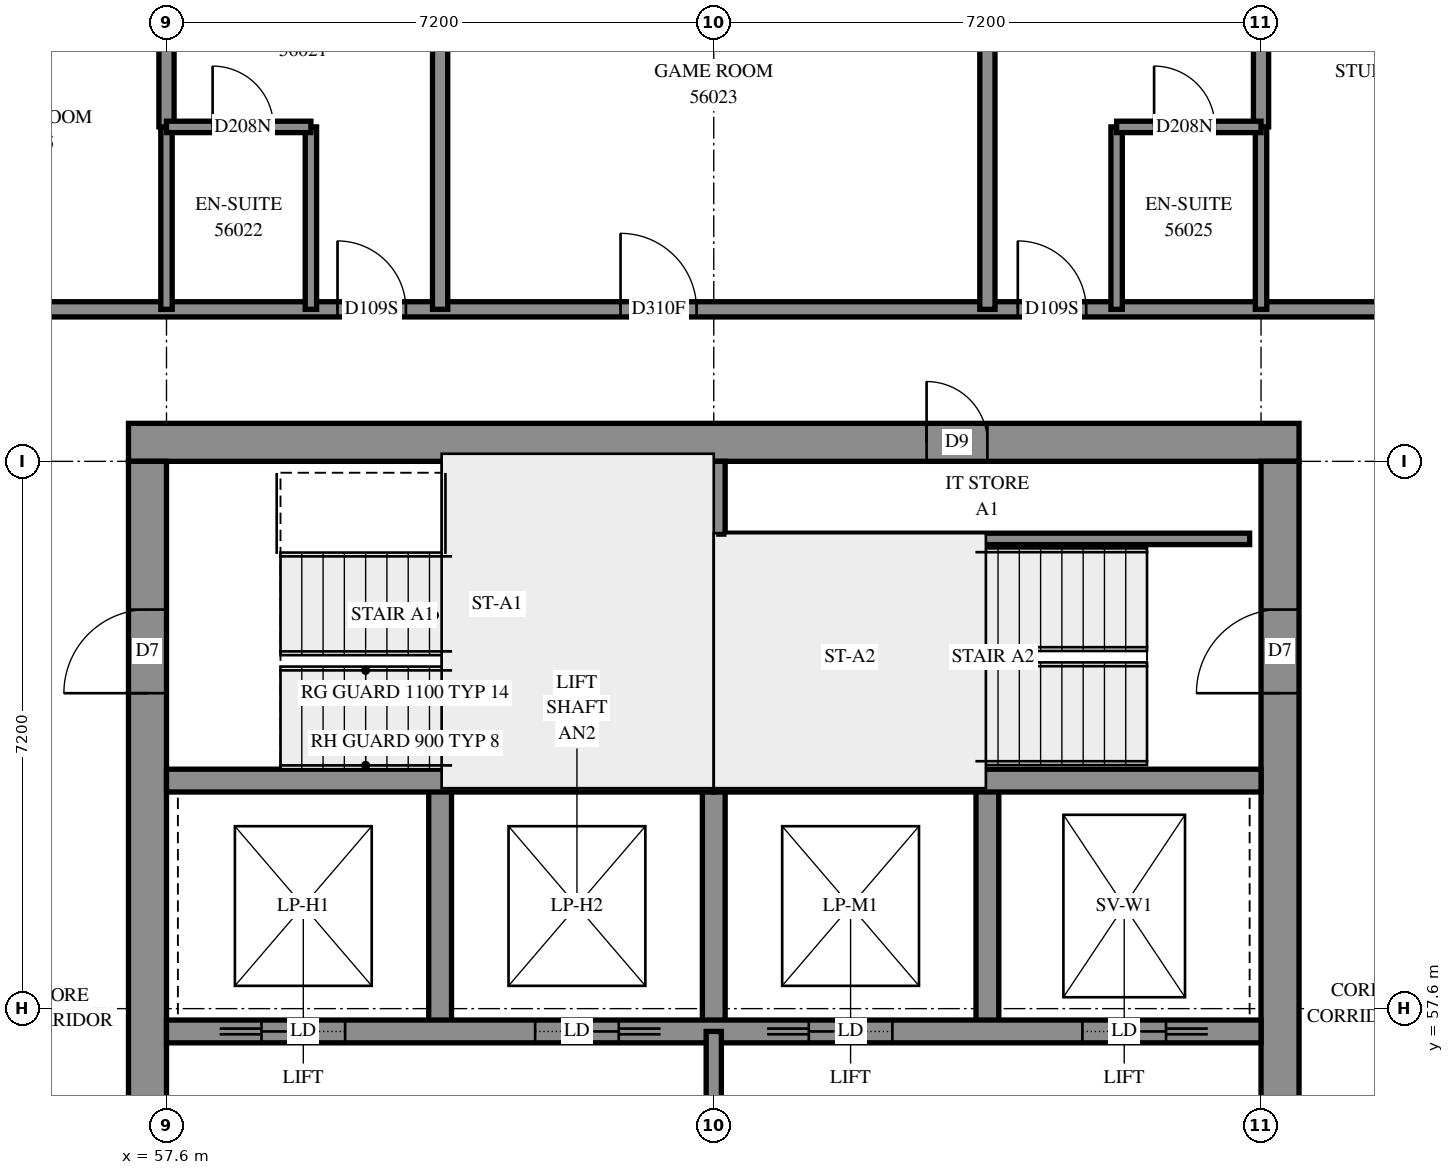
"""IFC4 building model, lengths in metres.
Left out: names, types, materials, properties, quantities, classifications, styles, units other than length and angle.
Written with IfcOpenShell. Run it as: python <this file> out.ifc"""

import sys

from ifc_helpers import new_model, si_unit, direction, frame, frame_2d, origin, place, context, subcontext, project, spatial, rectangle, extrude, element, fill, save


model = new_model("IFC4")
c1 = context("Model", 3, precision=1e-05, world=origin(), true_north=direction((0.0, 1.0)))
c2 = subcontext(c1, "Body", "Model", "MODEL_VIEW")
j1 = project(units=[si_unit("LENGTHUNIT", "METRE"), si_unit("PLANEANGLEUNIT", "RADIAN")], contexts=[c1])
p1 = place(None, origin())
s1 = spatial("IfcSite", under=j1, at=p1, CompositionType="ELEMENT")
p2 = place(p1, origin())
s2 = spatial("IfcBuilding", under=s1, at=p2, CompositionType="ELEMENT")
p3 = place(p2, frame((0.0, 0.0, 206.6)))
s3 = spatial("IfcBuildingStorey", under=s2, at=p3, CompositionType="ELEMENT", Elevation=206.6)
p4 = place(p3, frame((57.1, 65.05, -0.3), z_axis=(0.0, 0.0, 1.0), x_axis=(1.0, 0.0, 0.0)))
e1 = element("IfcWall", 1, at=p4, inside=s3, PredefinedType="SHEAR", context=c2, shape_type="SweptSolid", body=[
    extrude(rectangle(XDim=15.4, YDim=0.5, at=frame_2d((7.7, 0.0))), origin(), (0.0, 0.0, 1.0), 2.7),
])
p5 = place(p4, frame((10.5, 0.0, 0.3)))
e2 = element("IfcOpeningElement", 2, at=p5, cuts=e1, PredefinedType="OPENING", context=c2, shape_type="SweptSolid", body=[
    extrude(rectangle(XDim=0.8, YDim=2.1, at=frame_2d((0.4, 1.05))), frame((0.0, 0.26, 0.0), z_axis=(0.0, -1.0, 0.0), x_axis=(1.0, 0.0, 0.0)), (0.0, 0.0, 1.0), 0.52),
])
p6 = place(p3, frame((57.35, 50.4, -0.3), z_axis=(0.0, 0.0, 1.0), x_axis=(0.0, 1.0, 0.0)))
e3 = element("IfcWall", 3, at=p6, inside=s3, PredefinedType="SHEAR", context=c2, shape_type="SweptSolid", body=[
    extrude(rectangle(XDim=14.4, YDim=0.5, at=frame_2d((7.2, 0.0))), origin(), (0.0, 0.0, 1.0), 2.7),
])
p7 = place(p6, frame((4.55, 0.0, 0.3)))
e4 = element("IfcOpeningElement", 4, at=p7, cuts=e3, PredefinedType="OPENING", context=c2, shape_type="SweptSolid", body=[
    extrude(rectangle(XDim=1.1, YDim=2.1, at=frame_2d((0.55, 1.05))), frame((0.0, 0.26, 0.0), z_axis=(0.0, -1.0, 0.0), x_axis=(1.0, 0.0, 0.0)), (0.0, 0.0, 1.0), 0.52),
])
p8 = place(p6, frame((11.35, 0.0, 0.3)))
e5 = element("IfcOpeningElement", 5, at=p8, cuts=e3, PredefinedType="OPENING", context=c2, shape_type="SweptSolid", body=[
    extrude(rectangle(XDim=1.1, YDim=2.1, at=frame_2d((0.55, 1.05))), frame((0.0, 0.26, 0.0), z_axis=(0.0, -1.0, 0.0), x_axis=(1.0, 0.0, 0.0)), (0.0, 0.0, 1.0), 0.52),
])
p9 = place(p3, frame((72.25, 50.4, -0.3), z_axis=(0.0, 0.0, 1.0), x_axis=(0.0, 1.0, 0.0)))
e6 = element("IfcWall", 6, at=p9, inside=s3, PredefinedType="SHEAR", context=c2, shape_type="SweptSolid", body=[
    extrude(rectangle(XDim=14.4, YDim=0.5, at=frame_2d((7.2, 0.0))), origin(), (0.0, 0.0, 1.0), 2.7),
])
p10 = place(p9, frame((4.55, 0.0, 0.3)))
e7 = element("IfcOpeningElement", 7, at=p10, cuts=e6, PredefinedType="OPENING", context=c2, shape_type="SweptSolid", body=[
    extrude(rectangle(XDim=1.1, YDim=2.1, at=frame_2d((0.55, 1.05))), frame((0.0, 0.26, 0.0), z_axis=(0.0, -1.0, 0.0), x_axis=(1.0, 0.0, 0.0)), (0.0, 0.0, 1.0), 0.52),
])
p11 = place(p9, frame((11.35, 0.0, 0.3)))
e8 = element("IfcOpeningElement", 8, at=p11, cuts=e6, PredefinedType="OPENING", context=c2, shape_type="SweptSolid", body=[
    extrude(rectangle(XDim=1.1, YDim=2.1, at=frame_2d((0.55, 1.05))), frame((0.0, 0.26, 0.0), z_axis=(0.0, -1.0, 0.0), x_axis=(1.0, 0.0, 0.0)), (0.0, 0.0, 1.0), 0.52),
])
for number, where, z_axis, x_axis in (
    (9, (61.2, 57.3, 0.0), (0.0, 0.0, 1.0), (0.0, 1.0, 0.0)),
    (10, (64.8, 57.3, 0.0), (0.0, 0.0, 1.0), (0.0, 1.0, 0.0)),
    (11, (68.4, 57.3, 0.0), (0.0, 0.0, 1.0), (0.0, 1.0, 0.0)),
):
    element("IfcWall", number, at=place(p3, frame(where, z_axis=z_axis, x_axis=x_axis)), inside=s3, PredefinedType="SOLIDWALL", context=c2, shape_type="SweptSolid", body=[
        extrude(rectangle(XDim=3.3, YDim=0.3, at=frame_2d((1.65, 0.0))), origin(), (0.0, 0.0, 1.0), 3.1),
    ])
p12 = place(p3, frame((57.6, 57.3, 0.0), z_axis=(0.0, 0.0, 1.0), x_axis=(1.0, 0.0, 0.0)))
e12 = element("IfcWall", 12, at=p12, inside=s3, PredefinedType="SOLIDWALL", context=c2, shape_type="SweptSolid", body=[
    extrude(rectangle(XDim=14.4, YDim=0.3, at=frame_2d((7.2, 0.0))), origin(), (0.0, 0.0, 1.0), 3.1),
])
p13 = place(p12, frame((1.25, 0.0, 0.0)))
e13 = element("IfcOpeningElement", 13, at=p13, cuts=e12, PredefinedType="OPENING", context=c2, shape_type="SweptSolid", body=[
    extrude(rectangle(XDim=1.1, YDim=2.1, at=frame_2d((0.55, 1.05))), frame((0.0, 0.16, 0.0), z_axis=(0.0, -1.0, 0.0), x_axis=(1.0, 0.0, 0.0)), (0.0, 0.0, 1.0), 0.32),
])
p14 = place(p12, frame((4.85, 0.0, 0.0)))
e14 = element("IfcOpeningElement", 14, at=p14, cuts=e12, PredefinedType="OPENING", context=c2, shape_type="SweptSolid", body=[
    extrude(rectangle(XDim=1.1, YDim=2.1, at=frame_2d((0.55, 1.05))), frame((0.0, 0.16, 0.0), z_axis=(0.0, -1.0, 0.0), x_axis=(1.0, 0.0, 0.0)), (0.0, 0.0, 1.0), 0.32),
])
p15 = place(p12, frame((8.45, 0.0, 0.0)))
e15 = element("IfcOpeningElement", 15, at=p15, cuts=e12, PredefinedType="OPENING", context=c2, shape_type="SweptSolid", body=[
    extrude(rectangle(XDim=1.1, YDim=2.1, at=frame_2d((0.55, 1.05))), frame((0.0, 0.16, 0.0), z_axis=(0.0, -1.0, 0.0), x_axis=(1.0, 0.0, 0.0)), (0.0, 0.0, 1.0), 0.32),
])
p16 = place(p12, frame((12.05, 0.0, 0.0)))
e16 = element("IfcOpeningElement", 16, at=p16, cuts=e12, PredefinedType="OPENING", context=c2, shape_type="SweptSolid", body=[
    extrude(rectangle(XDim=1.1, YDim=2.1, at=frame_2d((0.55, 1.05))), frame((0.0, 0.16, 0.0), z_axis=(0.0, -1.0, 0.0), x_axis=(1.0, 0.0, 0.0)), (0.0, 0.0, 1.0), 0.32),
])
for number, where, z_axis, x_axis in (
    (17, (57.6, 60.6, 0.0), (0.0, 0.0, 1.0), (1.0, 0.0, 0.0)),
    (18, (64.8, 60.6, 0.0), (0.0, 0.0, 1.0), (1.0, 0.0, 0.0)),
):
    element("IfcWall", number, at=place(p3, frame(where, z_axis=z_axis, x_axis=x_axis)), inside=s3, PredefinedType="SOLIDWALL", context=c2, shape_type="SweptSolid", body=[
        extrude(rectangle(XDim=7.2, YDim=0.3, at=frame_2d((3.6, 0.0))), origin(), (0.0, 0.0, 1.0), 3.1),
    ])
p17 = place(p3, frame((64.8, 60.6, 0.0), z_axis=(0.0, 0.0, 1.0), x_axis=(0.0, 1.0, 0.0)))
e19 = element("IfcWall", 19, at=p17, inside=s3, PredefinedType="SOLIDWALL", context=c2, shape_type="SweptSolid", body=[
    extrude(rectangle(XDim=4.2, YDim=0.3, at=frame_2d((2.1, 0.0))), origin(), (0.0, 0.0, 1.0), 3.1),
])
p18 = place(p3, frame((64.95, 63.78, 0.0), z_axis=(0.0, 0.0, 1.0), x_axis=(1.0, 0.0, 0.0)))
e20 = element("IfcWall", 20, at=p18, inside=s3, PredefinedType="PARTITIONING", context=c2, shape_type="SweptSolid", body=[
    extrude(rectangle(XDim=6.9, YDim=0.15, at=frame_2d((3.45, 0.0))), origin(), (0.0, 0.0, 1.0), 3.1),
])
p19 = place(p3, frame((64.8, 53.7, 0.0), z_axis=(0.0, 0.0, 1.0), x_axis=(0.0, 1.0, 0.0)))
e21 = element("IfcWall", 21, at=p19, inside=s3, PredefinedType="PARTITIONING", context=c2, shape_type="SweptSolid", body=[
    extrude(rectangle(XDim=3.6, YDim=0.2, at=frame_2d((1.8, 0.0))), origin(), (0.0, 0.0, 1.0), 3.1),
])
p20 = place(p3, frame((55.6, 66.8, 0.0), z_axis=(0.0, 0.0, 1.0), x_axis=(1.0, 0.0, 0.0)))
e22 = element("IfcWall", 22, at=p20, inside=s3, PredefinedType="PARTITIONING", context=c2, shape_type="SweptSolid", body=[
    extrude(rectangle(XDim=18.4, YDim=0.2, at=frame_2d((9.2, 0.0))), origin(), (0.0, 0.0, 1.0), 3.1),
])
p21 = place(p20, frame((4.25, 0.0, 0.0)))
e23 = element("IfcOpeningElement", 23, at=p21, cuts=e22, PredefinedType="OPENING", context=c2, shape_type="SweptSolid", body=[
    extrude(rectangle(XDim=0.9, YDim=2.1, at=frame_2d((0.45, 1.05))), frame((0.0, 0.11, 0.0), z_axis=(0.0, -1.0, 0.0), x_axis=(1.0, 0.0, 0.0)), (0.0, 0.0, 1.0), 0.22),
])
p22 = place(p20, frame((7.974, 0.0, 0.0)))
e24 = element("IfcOpeningElement", 24, at=p22, cuts=e22, PredefinedType="OPENING", context=c2, shape_type="SweptSolid", body=[
    extrude(rectangle(XDim=1.0, YDim=2.1, at=frame_2d((0.5, 1.05))), frame((0.0, 0.11, 0.0), z_axis=(0.0, -1.0, 0.0), x_axis=(1.0, 0.0, 0.0)), (0.0, 0.0, 1.0), 0.22),
])
p23 = place(p20, frame((13.2, 0.0, 0.0)))
e25 = element("IfcOpeningElement", 25, at=p23, cuts=e22, PredefinedType="OPENING", context=c2, shape_type="SweptSolid", body=[
    extrude(rectangle(XDim=0.9, YDim=2.1, at=frame_2d((0.45, 1.05))), frame((0.0, 0.11, 0.0), z_axis=(0.0, -1.0, 0.0), x_axis=(1.0, 0.0, 0.0)), (0.0, 0.0, 1.0), 0.22),
])
p24 = place(p3, frame((68.4, 66.8, 0.0), z_axis=(0.0, 0.0, 1.0), x_axis=(0.0, 1.0, 0.0)))
e26 = element("IfcWall", 26, at=p24, inside=s3, PredefinedType="PARTITIONING", context=c2, shape_type="SweptSolid", body=[
    extrude(rectangle(XDim=5.926, YDim=0.2, at=frame_2d((2.963, 0.0))), origin(), (0.0, 0.0, 1.0), 3.1),
])
p25 = place(p3, frame((61.2, 66.8, 0.0), z_axis=(0.0, 0.0, 1.0), x_axis=(0.0, 1.0, 0.0)))
e27 = element("IfcWall", 27, at=p25, inside=s3, PredefinedType="PARTITIONING", context=c2, shape_type="SweptSolid", body=[
    extrude(rectangle(XDim=5.921, YDim=0.2, at=frame_2d((2.96, 0.0))), origin(), (0.0, 0.0, 1.0), 3.1),
])
for number, where, z_axis, x_axis in (
    (28, (57.6, 66.8, 0.0), (0.0, 0.0, 1.0), (0.0, 1.0, 0.0)),
    (29, (59.5, 66.8, 0.0), (0.0, 0.0, 1.0), (0.0, 1.0, 0.0)),
    (30, (70.1, 66.8, 0.0), (0.0, 0.0, 1.0), (0.0, 1.0, 0.0)),
    (31, (72.0, 66.8, 0.0), (0.0, 0.0, 1.0), (0.0, 1.0, 0.0)),
):
    element("IfcWall", number, at=place(p3, frame(where, z_axis=z_axis, x_axis=x_axis)), inside=s3, PredefinedType="PARTITIONING", context=c2, shape_type="SweptSolid", body=[
        extrude(rectangle(XDim=2.4, YDim=0.15, at=frame_2d((1.2, 0.0))), origin(), (0.0, 0.0, 1.0), 3.1),
    ])
p26 = place(p3, frame((72.0, 69.2, 0.0), z_axis=(0.0, 0.0, 1.0), x_axis=(0.0, 1.0, 0.0)))
e32 = element("IfcWall", 32, at=p26, inside=s3, PredefinedType="PARTITIONING", context=c2, shape_type="SweptSolid", body=[
    extrude(rectangle(XDim=2.4, YDim=0.2, at=frame_2d((1.2, 0.0))), origin(), (0.0, 0.0, 1.0), 3.1),
])
p27 = place(p3, frame((57.6, 69.2, 0.0), z_axis=(0.0, 0.0, 1.0), x_axis=(0.0, 1.0, 0.0)))
e33 = element("IfcWall", 33, at=p27, inside=s3, PredefinedType="PARTITIONING", context=c2, shape_type="SweptSolid", body=[
    extrude(rectangle(XDim=2.296, YDim=0.2, at=frame_2d((1.148, 0.0))), origin(), (0.0, 0.0, 1.0), 3.1),
])
p28 = place(p3, frame((70.1, 69.2, 0.0), z_axis=(0.0, 0.0, 1.0), x_axis=(1.0, 0.0, 0.0)))
e34 = element("IfcWall", 34, at=p28, inside=s3, PredefinedType="PARTITIONING", context=c2, shape_type="SweptSolid", body=[
    extrude(rectangle(XDim=1.9, YDim=0.15, at=frame_2d((0.95, 0.0))), origin(), (0.0, 0.0, 1.0), 3.1),
])
p29 = place(p28, frame((0.493, 0.0, 0.0)))
e35 = element("IfcOpeningElement", 35, at=p29, cuts=e34, PredefinedType="OPENING", context=c2, shape_type="SweptSolid", body=[
    extrude(rectangle(XDim=0.8, YDim=2.1, at=frame_2d((0.4, 1.05))), frame((0.0, 0.085, 0.0), z_axis=(0.0, -1.0, 0.0), x_axis=(1.0, 0.0, 0.0)), (0.0, 0.0, 1.0), 0.17),
])
p30 = place(p3, frame((57.6, 69.2, 0.0), z_axis=(0.0, 0.0, 1.0), x_axis=(1.0, 0.0, 0.0)))
e36 = element("IfcWall", 36, at=p30, inside=s3, PredefinedType="PARTITIONING", context=c2, shape_type="SweptSolid", body=[
    extrude(rectangle(XDim=1.9, YDim=0.15, at=frame_2d((0.95, 0.0))), origin(), (0.0, 0.0, 1.0), 3.1),
])
p31 = place(p30, frame((0.607, 0.0, 0.0)))
e37 = element("IfcOpeningElement", 37, at=p31, cuts=e36, PredefinedType="OPENING", context=c2, shape_type="SweptSolid", body=[
    extrude(rectangle(XDim=0.8, YDim=2.1, at=frame_2d((0.4, 1.05))), frame((0.0, 0.085, 0.0), z_axis=(0.0, -1.0, 0.0), x_axis=(1.0, 0.0, 0.0)), (0.0, 0.0, 1.0), 0.17),
])
p32 = place(p5, origin())
e38 = element("IfcDoor", 38, at=p32, inside=s3, OperationType="SINGLE_SWING_RIGHT", PredefinedType="DOOR", context=c2, shape_type="SweptSolid", body=[
    extrude(rectangle(XDim=0.8, YDim=2.1, at=frame_2d((0.4, 1.05))), frame((0.0, 0.025, 0.0), z_axis=(0.0, -1.0, 0.0), x_axis=(1.0, 0.0, 0.0)), (0.0, 0.0, 1.0), 0.05),
])
fill(e2, e38)
p33 = place(p8, origin())
e39 = element("IfcDoor", 39, at=p33, inside=s3, OperationType="SINGLE_SWING_LEFT", PredefinedType="DOOR", context=c2, shape_type="SweptSolid", body=[
    extrude(rectangle(XDim=1.1, YDim=2.1, at=frame_2d((0.55, 1.05))), frame((0.0, 0.025, 0.0), z_axis=(0.0, -1.0, 0.0), x_axis=(1.0, 0.0, 0.0)), (0.0, 0.0, 1.0), 0.05),
])
fill(e5, e39)
p34 = place(p11, origin())
e40 = element("IfcDoor", 40, at=p34, inside=s3, OperationType="SINGLE_SWING_RIGHT", PredefinedType="DOOR", context=c2, shape_type="SweptSolid", body=[
    extrude(rectangle(XDim=1.1, YDim=2.1, at=frame_2d((0.55, 1.05))), frame((0.0, 0.025, 0.0), z_axis=(0.0, -1.0, 0.0), x_axis=(1.0, 0.0, 0.0)), (0.0, 0.0, 1.0), 0.05),
])
fill(e8, e40)
p35 = place(p13, origin())
e41 = element("IfcDoor", 41, at=p35, inside=s3, OperationType="SLIDING_TO_LEFT", PredefinedType="DOOR", context=c2, shape_type="SweptSolid", body=[
    extrude(rectangle(XDim=1.1, YDim=2.1, at=frame_2d((0.55, 1.05))), frame((0.0, 0.025, 0.0), z_axis=(0.0, -1.0, 0.0), x_axis=(1.0, 0.0, 0.0)), (0.0, 0.0, 1.0), 0.05),
])
fill(e13, e41)
p36 = place(p14, origin())
e42 = element("IfcDoor", 42, at=p36, inside=s3, OperationType="SLIDING_TO_RIGHT", PredefinedType="DOOR", context=c2, shape_type="SweptSolid", body=[
    extrude(rectangle(XDim=1.1, YDim=2.1, at=frame_2d((0.55, 1.05))), frame((0.0, 0.025, 0.0), z_axis=(0.0, -1.0, 0.0), x_axis=(1.0, 0.0, 0.0)), (0.0, 0.0, 1.0), 0.05),
])
fill(e14, e42)
p37 = place(p15, origin())
e43 = element("IfcDoor", 43, at=p37, inside=s3, OperationType="SLIDING_TO_LEFT", PredefinedType="DOOR", context=c2, shape_type="SweptSolid", body=[
    extrude(rectangle(XDim=1.1, YDim=2.1, at=frame_2d((0.55, 1.05))), frame((0.0, 0.025, 0.0), z_axis=(0.0, -1.0, 0.0), x_axis=(1.0, 0.0, 0.0)), (0.0, 0.0, 1.0), 0.05),
])
fill(e15, e43)
p38 = place(p16, origin())
e44 = element("IfcDoor", 44, at=p38, inside=s3, OperationType="SLIDING_TO_RIGHT", PredefinedType="DOOR", context=c2, shape_type="SweptSolid", body=[
    extrude(rectangle(XDim=1.1, YDim=2.1, at=frame_2d((0.55, 1.05))), frame((0.0, 0.025, 0.0), z_axis=(0.0, -1.0, 0.0), x_axis=(1.0, 0.0, 0.0)), (0.0, 0.0, 1.0), 0.05),
])
fill(e16, e44)
p39 = place(p21, origin())
e45 = element("IfcDoor", 45, at=p39, inside=s3, OperationType="SINGLE_SWING_RIGHT", PredefinedType="DOOR", context=c2, shape_type="SweptSolid", body=[
    extrude(rectangle(XDim=0.9, YDim=2.1, at=frame_2d((0.45, 1.05))), frame((0.0, 0.025, 0.0), z_axis=(0.0, -1.0, 0.0), x_axis=(1.0, 0.0, 0.0)), (0.0, 0.0, 1.0), 0.05),
])
fill(e23, e45)
p40 = place(p31, origin())
e46 = element("IfcDoor", 46, at=p40, inside=s3, OperationType="SINGLE_SWING_RIGHT", PredefinedType="DOOR", context=c2, shape_type="SweptSolid", body=[
    extrude(rectangle(XDim=0.8, YDim=2.1, at=frame_2d((0.4, 1.05))), frame((0.0, 0.025, 0.0), z_axis=(0.0, -1.0, 0.0), x_axis=(1.0, 0.0, 0.0)), (0.0, 0.0, 1.0), 0.05),
])
fill(e37, e46)
p41 = place(p22, origin())
e47 = element("IfcDoor", 47, at=p41, inside=s3, OperationType="SINGLE_SWING_LEFT", PredefinedType="DOOR", context=c2, shape_type="SweptSolid", body=[
    extrude(rectangle(XDim=1.0, YDim=2.1, at=frame_2d((0.5, 1.05))), frame((0.0, 0.025, 0.0), z_axis=(0.0, -1.0, 0.0), x_axis=(1.0, 0.0, 0.0)), (0.0, 0.0, 1.0), 0.05),
])
fill(e24, e47)
p42 = place(p23, origin())
e48 = element("IfcDoor", 48, at=p42, inside=s3, OperationType="SINGLE_SWING_LEFT", PredefinedType="DOOR", context=c2, shape_type="SweptSolid", body=[
    extrude(rectangle(XDim=0.9, YDim=2.1, at=frame_2d((0.45, 1.05))), frame((0.0, 0.025, 0.0), z_axis=(0.0, -1.0, 0.0), x_axis=(1.0, 0.0, 0.0)), (0.0, 0.0, 1.0), 0.05),
])
fill(e25, e48)
p43 = place(p29, origin())
e49 = element("IfcDoor", 49, at=p43, inside=s3, OperationType="SINGLE_SWING_RIGHT", PredefinedType="DOOR", context=c2, shape_type="SweptSolid", body=[
    extrude(rectangle(XDim=0.8, YDim=2.1, at=frame_2d((0.4, 1.05))), frame((0.0, 0.025, 0.0), z_axis=(0.0, -1.0, 0.0), x_axis=(1.0, 0.0, 0.0)), (0.0, 0.0, 1.0), 0.05),
])
fill(e35, e49)
save(model, sys.argv[1])
